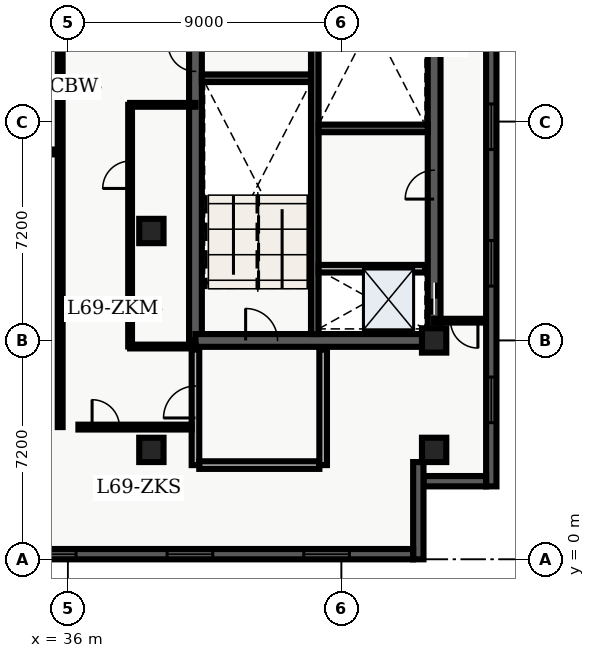
"""IFC4 building model, lengths in metres.
Left out: names, types, materials, properties, quantities, classifications, styles, units other than length and angle.
Written with IfcOpenShell. Run it as: python <this file> out.ifc"""

import sys

from ifc_helpers import new_model, entity, si_unit, converted_unit, direction, frame, origin_with_axes, origin_2d_with_axis, place, context, subcontext, project, spatial, polyline, rectangle, outline, extrude, element, fill, save


model = new_model("IFC4")
c1 = context("Model", 3, precision=1e-05, world=origin_with_axes(), true_north=direction((0.0, 1.0)))
c2 = subcontext(c1, "Body", "Model", "MODEL_VIEW")
j1 = project(units=[si_unit("LENGTHUNIT", "METRE"), converted_unit("PLANEANGLEUNIT", "DEGREE", entity("IfcPlaneAngleMeasure", 0.017), si_unit("PLANEANGLEUNIT", "RADIAN"), dimensions=[0, 0, 0, 0, 0, 0, 0])], contexts=[c1])
p1 = place(None, origin_with_axes())
s1 = spatial("IfcSite", under=j1, at=p1, CompositionType="ELEMENT")
p2 = place(p1, origin_with_axes())
s2 = spatial("IfcBuilding", under=s1, at=p2, CompositionType="ELEMENT")
p3 = place(p2, frame((0.0, 0.0, 280.2), z_axis=(0.0, 0.0, 1.0), x_axis=(1.0, 0.0, 0.0)))
s3 = spatial("IfcBuildingStorey", under=s2, at=p3, CompositionType="ELEMENT", Elevation=280.2)
p4 = place(p3, frame((40.2, 7.2, 0.0), z_axis=(0.0, 0.0, 1.0), x_axis=(0.0, 1.0, 0.0)))
e1 = element("IfcWall", 1, at=p4, inside=s3, PredefinedType="SHEAR", context=c2, shape_type="SweptSolid", body=[
    extrude(outline(polyline([(0.0, -0.21), (15.6, -0.21), (15.6, 0.21), (0.0, 0.21), (0.0, -0.21)])), origin_with_axes(), (0.0, 0.0, 1.0), 3.66),
])
p5 = place(p4, frame((12.75, 0.0, 0.0), z_axis=(0.0, 0.0, 1.0), x_axis=(1.0, 0.0, 0.0)))
e2 = element("IfcOpeningElement", 2, at=p5, cuts=e1, PredefinedType="OPENING", context=c2, shape_type="SweptSolid", body=[
    extrude(rectangle(XDim=1.2, YDim=0.44, at=origin_2d_with_axis()), origin_with_axes(), (0.0, 0.0, 1.0), 2.15),
])
p6 = place(p4, frame((9.3, 0.0, 0.0), z_axis=(0.0, 0.0, 1.0), x_axis=(1.0, 0.0, 0.0)))
e3 = element("IfcOpeningElement", 3, at=p6, cuts=e1, PredefinedType="OPENING", context=c2, shape_type="SweptSolid", body=[
    extrude(rectangle(XDim=0.9, YDim=0.44, at=origin_2d_with_axis()), origin_with_axes(), (0.0, 0.0, 1.0), 2.15),
])
p7 = place(p3, frame((40.2, 7.2, 0.0), z_axis=(0.0, 0.0, 1.0), x_axis=(1.0, 0.0, 0.0)))
e4 = element("IfcWall", 4, at=p7, inside=s3, PredefinedType="SHEAR", context=c2, shape_type="SweptSolid", body=[
    extrude(outline(polyline([(0.0, -0.21), (7.85, -0.21), (7.85, 0.21), (0.0, 0.21), (0.0, -0.21)])), origin_with_axes(), (0.0, 0.0, 1.0), 3.66),
])
p8 = place(p7, frame((2.175, 0.0, 0.0), z_axis=(0.0, 0.0, 1.0), x_axis=(1.0, 0.0, 0.0)))
e5 = element("IfcOpeningElement", 5, at=p8, cuts=e4, PredefinedType="OPENING", context=c2, shape_type="SweptSolid", body=[
    extrude(rectangle(XDim=1.05, YDim=0.44, at=origin_2d_with_axis()), origin_with_axes(), (0.0, 0.0, 1.0), 2.15),
])
p9 = place(p3, frame((48.05, 7.2, 0.0), z_axis=(0.0, 0.0, 1.0), x_axis=(0.0, 1.0, 0.0)))
e6 = element("IfcWall", 6, at=p9, inside=s3, PredefinedType="SHEAR", context=c2, shape_type="SweptSolid", body=[
    extrude(outline(polyline([(0.0, -0.21), (15.6, -0.21), (15.6, 0.21), (0.0, 0.21), (0.0, -0.21)])), origin_with_axes(), (0.0, 0.0, 1.0), 3.66),
])
p10 = place(p9, frame((1.375, 0.0, 0.0), z_axis=(0.0, 0.0, 1.0), x_axis=(1.0, 0.0, 0.0)))
e7 = element("IfcOpeningElement", 7, at=p10, cuts=e6, PredefinedType="OPENING", context=c2, shape_type="SweptSolid", body=[
    extrude(rectangle(XDim=1.05, YDim=0.44, at=origin_2d_with_axis()), origin_with_axes(), (0.0, 0.0, 1.0), 2.15),
])
p11 = place(p9, frame((5.125, 0.0, 0.0), z_axis=(0.0, 0.0, 1.0), x_axis=(1.0, 0.0, 0.0)))
e8 = element("IfcOpeningElement", 8, at=p11, cuts=e6, PredefinedType="OPENING", context=c2, shape_type="SweptSolid", body=[
    extrude(rectangle(XDim=0.95, YDim=0.44, at=origin_2d_with_axis()), origin_with_axes(), (0.0, 0.0, 1.0), 2.15),
])
p12 = place(p3, frame((44.125, 7.41, 0.0), z_axis=(0.0, 0.0, 1.0), x_axis=(0.0, 1.0, 0.0)))
e9 = element("IfcWall", 9, at=p12, inside=s3, PredefinedType="SHEAR", context=c2, shape_type="SweptSolid", body=[
    extrude(outline(polyline([(0.0, -0.125), (15.18, -0.125), (15.18, 0.125), (0.0, 0.125), (0.0, -0.125)])), origin_with_axes(), (0.0, 0.0, 1.0), 3.66),
])
for number, where, z_axis, x_axis in (
    (10, (40.41, 15.825, 0.0), (0.0, 0.0, 1.0), (1.0, 0.0, 0.0)),
    (11, (44.25, 14.175, 0.0), (0.0, 0.0, 1.0), (1.0, 0.0, 0.0)),
):
    element("IfcWall", number, at=place(p3, frame(where, z_axis=z_axis, x_axis=x_axis)), inside=s3, PredefinedType="SHEAR", context=c2, shape_type="SweptSolid", body=[
        extrude(outline(polyline([(0.0, -0.125), (3.59, -0.125), (3.59, 0.125), (0.0, 0.125), (0.0, -0.125)])), origin_with_axes(), (0.0, 0.0, 1.0), 3.66),
    ])
p13 = place(p3, frame((40.2, 3.1, 0.0), z_axis=(0.0, 0.0, 1.0), x_axis=(0.0, 1.0, 0.0)))
e12 = element("IfcWall", 12, at=p13, inside=s3, PredefinedType="SOLIDWALL", context=c2, shape_type="SweptSolid", body=[
    extrude(outline(polyline([(0.0, -0.125), (3.8, -0.125), (3.8, 0.125), (0.0, 0.125), (0.0, -0.125)])), origin_with_axes(), (0.0, 0.0, 1.0), 2.7),
])
p14 = place(p13, frame((2.075, 0.0, 0.0), z_axis=(0.0, 0.0, 1.0), x_axis=(1.0, 0.0, 0.0)))
e13 = element("IfcOpeningElement", 13, at=p14, cuts=e12, PredefinedType="OPENING", context=c2, shape_type="SweptSolid", body=[
    extrude(rectangle(XDim=1.05, YDim=0.27, at=origin_2d_with_axis()), origin_with_axes(), (0.0, 0.0, 1.0), 2.15),
])
p15 = place(p3, frame((40.325, 3.1, 0.0), z_axis=(0.0, 0.0, 1.0), x_axis=(1.0, 0.0, 0.0)))
e14 = element("IfcWall", 14, at=p15, inside=s3, PredefinedType="SOLIDWALL", context=c2, shape_type="SweptSolid", body=[
    extrude(outline(polyline([(0.0, -0.125), (3.95, -0.125), (3.95, 0.125), (0.0, 0.125), (0.0, -0.125)])), origin_with_axes(), (0.0, 0.0, 1.0), 2.7),
])
p16 = place(p3, frame((44.4, 3.1, 0.0), z_axis=(0.0, 0.0, 1.0), x_axis=(0.0, 1.0, 0.0)))
e15 = element("IfcWall", 15, at=p16, inside=s3, PredefinedType="SOLIDWALL", context=c2, shape_type="SweptSolid", body=[
    extrude(outline(polyline([(0.0, -0.125), (3.8, -0.125), (3.8, 0.125), (0.0, 0.125), (0.0, -0.125)])), origin_with_axes(), (0.0, 0.0, 1.0), 2.7),
])
for number, where, z_axis, x_axis in (
    (16, (38.75, 3.6, 0.0), (0.0, 0.0, 1.0), (1.0, 0.0, 0.0)),
    (17, (38.75, 10.8, 0.0), (0.0, 0.0, 1.0), (1.0, 0.0, 0.0)),
    (18, (48.05, 3.6, 0.0), (0.0, 0.0, 1.0), (1.0, 0.0, 0.0)),
    (19, (48.05, 7.2, 0.0), (0.0, 0.0, 1.0), (1.0, 0.0, 0.0)),
):
    element("IfcColumn", number, at=place(p3, frame(where, z_axis=z_axis, x_axis=x_axis)), inside=s3, PredefinedType="COLUMN", context=c2, shape_type="SweptSolid", body=[
        extrude(rectangle(XDim=0.8, YDim=0.8, at=origin_2d_with_axis()), origin_with_axes(), (0.0, 0.0, 1.0), 3.9),
    ])
p17 = place(p3, frame((44.25, 9.56, 0.0), z_axis=(0.0, 0.0, 1.0), x_axis=(1.0, 0.0, 0.0)))
e20 = element("IfcWall", 20, at=p17, inside=s3, PredefinedType="SOLIDWALL", context=c2, shape_type="SweptSolid", body=[
    extrude(outline(polyline([(0.0, -0.125), (3.5, -0.125), (3.5, 0.125), (0.0, 0.125), (0.0, -0.125)])), origin_with_axes(), (0.0, 0.0, 1.0), 2.7),
])
p18 = place(p3, frame((20.3, 13.4, 0.0), z_axis=(0.0, 0.0, 1.0), x_axis=(1.0, 0.0, 0.0)))
e21 = element("IfcWall", 21, at=p18, inside=s3, PredefinedType="PARTITIONING", context=c2, shape_type="SweptSolid", body=[
    extrude(outline(polyline([(0.0, -0.08), (15.45, -0.08), (15.45, 0.08), (0.0, 0.08), (0.0, -0.08)])), origin_with_axes(), (0.0, 0.0, 1.0), 2.7),
])
p19 = place(p18, frame((2.304, 0.0, 0.0), z_axis=(0.0, 0.0, 1.0), x_axis=(1.0, 0.0, 0.0)))
e22 = element("IfcOpeningElement", 22, at=p19, cuts=e21, PredefinedType="OPENING", context=c2, shape_type="SweptSolid", body=[
    extrude(rectangle(XDim=1.0, YDim=0.18, at=origin_2d_with_axis()), origin_with_axes(), (0.0, 0.0, 1.0), 2.15),
])
p20 = place(p18, frame((6.866, 0.0, 0.0), z_axis=(0.0, 0.0, 1.0), x_axis=(1.0, 0.0, 0.0)))
e23 = element("IfcOpeningElement", 23, at=p20, cuts=e21, PredefinedType="OPENING", context=c2, shape_type="SweptSolid", body=[
    extrude(rectangle(XDim=1.0, YDim=0.18, at=origin_2d_with_axis()), origin_with_axes(), (0.0, 0.0, 1.0), 2.15),
])
p21 = place(p18, frame((12.337, 0.0, 0.0), z_axis=(0.0, 0.0, 1.0), x_axis=(1.0, 0.0, 0.0)))
e24 = element("IfcOpeningElement", 24, at=p21, cuts=e21, PredefinedType="OPENING", context=c2, shape_type="SweptSolid", body=[
    extrude(rectangle(XDim=1.2, YDim=0.18, at=origin_2d_with_axis()), origin_with_axes(), (0.0, 0.0, 1.0), 2.2),
])
p22 = place(p3, frame((20.3, 15.7, 0.0), z_axis=(0.0, 0.0, 1.0), x_axis=(1.0, 0.0, 0.0)))
e25 = element("IfcWall", 25, at=p22, inside=s3, PredefinedType="PARTITIONING", context=c2, shape_type="SweptSolid", body=[
    extrude(outline(polyline([(0.0, -0.08), (15.45, -0.08), (15.45, 0.08), (0.0, 0.08), (0.0, -0.08)])), origin_with_axes(), (0.0, 0.0, 1.0), 2.7),
])
p23 = place(p22, frame((7.775, 0.0, 0.0), z_axis=(0.0, 0.0, 1.0), x_axis=(1.0, 0.0, 0.0)))
e26 = element("IfcOpeningElement", 26, at=p23, cuts=e25, PredefinedType="OPENING", context=c2, shape_type="SweptSolid", body=[
    extrude(rectangle(XDim=1.0, YDim=0.18, at=origin_2d_with_axis()), origin_with_axes(), (0.0, 0.0, 1.0), 2.15),
])
p24 = place(p3, frame((35.75, 4.35, 0.0), z_axis=(0.0, 0.0, 1.0), x_axis=(0.0, 1.0, 0.0)))
e27 = element("IfcWall", 27, at=p24, inside=s3, PredefinedType="PARTITIONING", context=c2, shape_type="SweptSolid", body=[
    extrude(outline(polyline([(0.0, -0.08), (16.95, -0.08), (16.95, 0.08), (0.0, 0.08), (0.0, -0.08)])), origin_with_axes(), (0.0, 0.0, 1.0), 2.7),
])
p25 = place(p3, frame((49.765, 7.85, 0.0), z_axis=(0.0, 0.0, 1.0), x_axis=(-1.0, 0.0, 0.0)))
e28 = element("IfcWall", 28, at=p25, inside=s3, PredefinedType="PARTITIONING", context=c2, shape_type="SweptSolid", body=[
    extrude(outline(polyline([(0.0, -0.062), (1.715, -0.062), (1.715, 0.062), (0.0, 0.062), (0.0, -0.062)])), origin_with_axes(), (0.0, 0.0, 1.0), 2.7),
])
p26 = place(p25, frame((0.725, 0.0, 0.0), z_axis=(0.0, 0.0, 1.0), x_axis=(1.0, 0.0, 0.0)))
e29 = element("IfcOpeningElement", 29, at=p26, cuts=e28, PredefinedType="OPENING", context=c2, shape_type="SweptSolid", body=[
    extrude(rectangle(XDim=0.9, YDim=0.145, at=origin_2d_with_axis()), origin_with_axes(), (0.0, 0.0, 1.0), 2.15),
])
p27 = place(p3, frame((36.35, 4.35, 0.0), z_axis=(0.0, 0.0, 1.0), x_axis=(1.0, 0.0, 0.0)))
e30 = element("IfcWall", 30, at=p27, inside=s3, PredefinedType="PARTITIONING", context=c2, shape_type="SweptSolid", body=[
    extrude(outline(polyline([(0.0, -0.08), (3.725, -0.08), (3.725, 0.08), (0.0, 0.08), (0.0, -0.08)])), origin_with_axes(), (0.0, 0.0, 1.0), 2.7),
])
p28 = place(p27, frame((0.9, 0.0, 0.0), z_axis=(0.0, 0.0, 1.0), x_axis=(1.0, 0.0, 0.0)))
e31 = element("IfcOpeningElement", 31, at=p28, cuts=e30, PredefinedType="OPENING", context=c2, shape_type="SweptSolid", body=[
    extrude(rectangle(XDim=0.9, YDim=0.18, at=origin_2d_with_axis()), origin_with_axes(), (0.0, 0.0, 1.0), 2.15),
])
for number, where, z_axis, x_axis in (
    (32, (38.05, 7.0, 0.0), (0.0, 0.0, 1.0), (1.0, 0.0, 0.0)),
    (33, (38.05, 14.95, 0.0), (0.0, 0.0, 1.0), (1.0, 0.0, 0.0)),
):
    element("IfcWall", number, at=place(p3, frame(where, z_axis=z_axis, x_axis=x_axis)), inside=s3, PredefinedType="PARTITIONING", context=c2, shape_type="SweptSolid", body=[
        extrude(outline(polyline([(0.0, -0.062), (2.15, -0.062), (2.15, 0.062), (0.0, 0.062), (0.0, -0.062)])), origin_with_axes(), (0.0, 0.0, 1.0), 2.7),
    ])
p29 = place(p3, frame((38.05, 7.0, 0.0), z_axis=(0.0, 0.0, 1.0), x_axis=(0.0, 1.0, 0.0)))
e34 = element("IfcWall", 34, at=p29, inside=s3, PredefinedType="PARTITIONING", context=c2, shape_type="SweptSolid", body=[
    extrude(outline(polyline([(0.0, -0.062), (7.95, -0.062), (7.95, 0.062), (0.0, 0.062), (0.0, -0.062)])), origin_with_axes(), (0.0, 0.0, 1.0), 2.7),
])
p30 = place(p29, frame((5.65, 0.0, 0.0), z_axis=(0.0, 0.0, 1.0), x_axis=(1.0, 0.0, 0.0)))
e35 = element("IfcOpeningElement", 35, at=p30, cuts=e34, PredefinedType="OPENING", context=c2, shape_type="SweptSolid", body=[
    extrude(rectangle(XDim=0.9, YDim=0.145, at=origin_2d_with_axis()), origin_with_axes(), (0.0, 0.0, 1.0), 2.15),
])
p31 = place(p3, frame((49.93, 26.06, 0.0), z_axis=(0.0, 0.0, 1.0), x_axis=(0.0, -1.0, 0.0)))
e36 = element("IfcWall", 36, at=p31, inside=s3, PredefinedType="SOLIDWALL", context=c2, shape_type="SweptSolid", body=[
    extrude(outline(polyline([(0.0, -0.17), (23.66, -0.17), (23.66, 0.17), (0.0, 0.17), (0.0, -0.17)])), origin_with_axes(), (0.0, 0.0, 1.0), 3.66),
])
p32 = place(p31, frame((2.846, 0.0, 0.45), z_axis=(0.0, 0.0, 1.0), x_axis=(1.0, 0.0, 0.0)))
e37 = element("IfcOpeningElement", 37, at=p32, cuts=e36, PredefinedType="OPENING", context=c2, shape_type="SweptSolid", body=[
    extrude(rectangle(XDim=1.5, YDim=0.36, at=origin_2d_with_axis()), origin_with_axes(), (0.0, 0.0, 1.0), 2.1),
])
p33 = place(p31, frame((7.338, 0.0, 0.45), z_axis=(0.0, 0.0, 1.0), x_axis=(1.0, 0.0, 0.0)))
e38 = element("IfcOpeningElement", 38, at=p33, cuts=e36, PredefinedType="OPENING", context=c2, shape_type="SweptSolid", body=[
    extrude(rectangle(XDim=1.5, YDim=0.36, at=origin_2d_with_axis()), origin_with_axes(), (0.0, 0.0, 1.0), 2.1),
])
p34 = place(p31, frame((11.83, 0.0, 0.45), z_axis=(0.0, 0.0, 1.0), x_axis=(1.0, 0.0, 0.0)))
e39 = element("IfcOpeningElement", 39, at=p34, cuts=e36, PredefinedType="OPENING", context=c2, shape_type="SweptSolid", body=[
    extrude(rectangle(XDim=1.5, YDim=0.36, at=origin_2d_with_axis()), origin_with_axes(), (0.0, 0.0, 1.0), 2.1),
])
p35 = place(p31, frame((16.322, 0.0, 0.45), z_axis=(0.0, 0.0, 1.0), x_axis=(1.0, 0.0, 0.0)))
e40 = element("IfcOpeningElement", 40, at=p35, cuts=e36, PredefinedType="OPENING", context=c2, shape_type="SweptSolid", body=[
    extrude(rectangle(XDim=1.5, YDim=0.36, at=origin_2d_with_axis()), origin_with_axes(), (0.0, 0.0, 1.0), 2.1),
])
p36 = place(p31, frame((20.814, 0.0, 0.45), z_axis=(0.0, 0.0, 1.0), x_axis=(1.0, 0.0, 0.0)))
e41 = element("IfcOpeningElement", 41, at=p36, cuts=e36, PredefinedType="OPENING", context=c2, shape_type="SweptSolid", body=[
    extrude(rectangle(XDim=1.5, YDim=0.36, at=origin_2d_with_axis()), origin_with_axes(), (0.0, 0.0, 1.0), 2.1),
])
p37 = place(p3, frame((49.76, 2.57, 0.0), z_axis=(0.0, 0.0, 1.0), x_axis=(-1.0, 0.0, 0.0)))
e42 = element("IfcWall", 42, at=p37, inside=s3, PredefinedType="SOLIDWALL", context=c2, shape_type="SweptSolid", body=[
    extrude(outline(polyline([(0.0, -0.17), (2.06, -0.17), (2.06, 0.17), (0.0, 0.17), (0.0, -0.17)])), origin_with_axes(), (0.0, 0.0, 1.0), 3.66),
])
p38 = place(p3, frame((47.53, 3.2, 0.0), z_axis=(0.0, 0.0, 1.0), x_axis=(0.0, -1.0, 0.0)))
e43 = element("IfcWall", 43, at=p38, inside=s3, PredefinedType="SOLIDWALL", context=c2, shape_type="SweptSolid", body=[
    extrude(outline(polyline([(0.0, -0.17), (3.2, -0.17), (3.2, 0.17), (0.0, 0.17), (0.0, -0.17)])), origin_with_axes(), (0.0, 0.0, 1.0), 3.66),
])
p39 = place(p3, frame((47.36, 0.17, 0.0), z_axis=(0.0, 0.0, 1.0), x_axis=(-1.0, 0.0, 0.0)))
e44 = element("IfcWall", 44, at=p39, inside=s3, PredefinedType="SOLIDWALL", context=c2, shape_type="SweptSolid", body=[
    extrude(outline(polyline([(0.0, -0.17), (37.16, -0.17), (37.16, 0.17), (0.0, 0.17), (0.0, -0.17)])), origin_with_axes(), (0.0, 0.0, 1.0), 3.66),
])
p40 = place(p39, frame((2.847, 0.0, 0.45), z_axis=(0.0, 0.0, 1.0), x_axis=(1.0, 0.0, 0.0)))
e45 = element("IfcOpeningElement", 45, at=p40, cuts=e44, PredefinedType="OPENING", context=c2, shape_type="SweptSolid", body=[
    extrude(rectangle(XDim=1.5, YDim=0.36, at=origin_2d_with_axis()), origin_with_axes(), (0.0, 0.0, 1.0), 2.1),
])
p41 = place(p39, frame((7.342, 0.0, 0.45), z_axis=(0.0, 0.0, 1.0), x_axis=(1.0, 0.0, 0.0)))
e46 = element("IfcOpeningElement", 46, at=p41, cuts=e44, PredefinedType="OPENING", context=c2, shape_type="SweptSolid", body=[
    extrude(rectangle(XDim=1.5, YDim=0.36, at=origin_2d_with_axis()), origin_with_axes(), (0.0, 0.0, 1.0), 2.1),
])
p42 = place(p39, frame((11.837, 0.0, 0.45), z_axis=(0.0, 0.0, 1.0), x_axis=(1.0, 0.0, 0.0)))
e47 = element("IfcOpeningElement", 47, at=p42, cuts=e44, PredefinedType="OPENING", context=c2, shape_type="SweptSolid", body=[
    extrude(rectangle(XDim=1.5, YDim=0.36, at=origin_2d_with_axis()), origin_with_axes(), (0.0, 0.0, 1.0), 2.1),
])
p43 = place(p39, frame((16.332, 0.0, 0.45), z_axis=(0.0, 0.0, 1.0), x_axis=(1.0, 0.0, 0.0)))
e48 = element("IfcOpeningElement", 48, at=p43, cuts=e44, PredefinedType="OPENING", context=c2, shape_type="SweptSolid", body=[
    extrude(rectangle(XDim=1.5, YDim=0.36, at=origin_2d_with_axis()), origin_with_axes(), (0.0, 0.0, 1.0), 2.1),
])
p44 = place(p39, frame((20.827, 0.0, 0.45), z_axis=(0.0, 0.0, 1.0), x_axis=(1.0, 0.0, 0.0)))
e49 = element("IfcOpeningElement", 49, at=p44, cuts=e44, PredefinedType="OPENING", context=c2, shape_type="SweptSolid", body=[
    extrude(rectangle(XDim=1.5, YDim=0.36, at=origin_2d_with_axis()), origin_with_axes(), (0.0, 0.0, 1.0), 2.1),
])
p45 = place(p39, frame((25.322, 0.0, 0.45), z_axis=(0.0, 0.0, 1.0), x_axis=(1.0, 0.0, 0.0)))
e50 = element("IfcOpeningElement", 50, at=p45, cuts=e44, PredefinedType="OPENING", context=c2, shape_type="SweptSolid", body=[
    extrude(rectangle(XDim=1.5, YDim=0.36, at=origin_2d_with_axis()), origin_with_axes(), (0.0, 0.0, 1.0), 2.1),
])
p46 = place(p39, frame((29.817, 0.0, 0.45), z_axis=(0.0, 0.0, 1.0), x_axis=(1.0, 0.0, 0.0)))
e51 = element("IfcOpeningElement", 51, at=p46, cuts=e44, PredefinedType="OPENING", context=c2, shape_type="SweptSolid", body=[
    extrude(rectangle(XDim=1.5, YDim=0.36, at=origin_2d_with_axis()), origin_with_axes(), (0.0, 0.0, 1.0), 2.1),
])
p47 = place(p39, frame((34.312, 0.0, 0.45), z_axis=(0.0, 0.0, 1.0), x_axis=(1.0, 0.0, 0.0)))
e52 = element("IfcOpeningElement", 52, at=p47, cuts=e44, PredefinedType="OPENING", context=c2, shape_type="SweptSolid", body=[
    extrude(rectangle(XDim=1.5, YDim=0.36, at=origin_2d_with_axis()), origin_with_axes(), (0.0, 0.0, 1.0), 2.1),
])
p48 = place(p9, frame((1.375, 0.0, 0.0), z_axis=(0.0, 0.0, 1.0), x_axis=(1.0, 0.0, 0.0)))
e53 = element("IfcDoor", 53, at=p48, inside=s3, OperationType="SLIDING_TO_LEFT", PredefinedType="DOOR", context=c2, shape_type="SweptSolid", body=[
    extrude(rectangle(XDim=1.05, YDim=0.09, at=origin_2d_with_axis()), origin_with_axes(), (0.0, 0.0, 1.0), 2.15),
])
fill(e7, e53)
p49 = place(p4, frame((9.3, 0.0, 0.0), z_axis=(0.0, 0.0, 1.0), x_axis=(1.0, 0.0, 0.0)))
e54 = element("IfcDoor", 54, at=p49, inside=s3, OperationType="SINGLE_SWING_RIGHT", PredefinedType="DOOR", context=c2, shape_type="SweptSolid", body=[
    extrude(rectangle(XDim=0.9, YDim=0.09, at=origin_2d_with_axis()), origin_with_axes(), (0.0, 0.0, 1.0), 2.15),
])
fill(e3, e54)
p50 = place(p7, frame((2.175, 0.0, 0.0), z_axis=(0.0, 0.0, 1.0), x_axis=(1.0, 0.0, 0.0)))
e55 = element("IfcDoor", 55, at=p50, inside=s3, OperationType="SINGLE_SWING_LEFT", PredefinedType="DOOR", context=c2, shape_type="SweptSolid", body=[
    extrude(rectangle(XDim=1.05, YDim=0.09, at=origin_2d_with_axis()), origin_with_axes(), (0.0, 0.0, 1.0), 2.15),
])
fill(e5, e55)
p51 = place(p13, frame((2.075, 0.0, 0.0), z_axis=(0.0, 0.0, 1.0), x_axis=(1.0, 0.0, 0.0)))
e56 = element("IfcDoor", 56, at=p51, inside=s3, OperationType="SINGLE_SWING_LEFT", PredefinedType="DOOR", context=c2, shape_type="SweptSolid", body=[
    extrude(rectangle(XDim=1.05, YDim=0.09, at=origin_2d_with_axis()), origin_with_axes(), (0.0, 0.0, 1.0), 2.15),
])
fill(e13, e56)
p52 = place(p9, frame((5.125, 0.0, 0.0), z_axis=(0.0, 0.0, 1.0), x_axis=(1.0, 0.0, 0.0)))
e57 = element("IfcDoor", 57, at=p52, inside=s3, OperationType="SINGLE_SWING_LEFT", PredefinedType="DOOR", context=c2, shape_type="SweptSolid", body=[
    extrude(rectangle(XDim=0.95, YDim=0.09, at=origin_2d_with_axis()), origin_with_axes(), (0.0, 0.0, 1.0), 2.15),
])
fill(e8, e57)
p53 = place(p25, frame((0.725, 0.0, 0.0), z_axis=(0.0, 0.0, 1.0), x_axis=(1.0, 0.0, 0.0)))
e58 = element("IfcDoor", 58, at=p53, inside=s3, OperationType="SINGLE_SWING_LEFT", PredefinedType="DOOR", context=c2, shape_type="SweptSolid", body=[
    extrude(rectangle(XDim=0.9, YDim=0.075, at=origin_2d_with_axis()), origin_with_axes(), (0.0, 0.0, 1.0), 2.15),
])
fill(e29, e58)
p54 = place(p27, frame((0.9, 0.0, 0.0), z_axis=(0.0, 0.0, 1.0), x_axis=(1.0, 0.0, 0.0)))
e59 = element("IfcDoor", 59, at=p54, inside=s3, OperationType="SINGLE_SWING_LEFT", PredefinedType="DOOR", context=c2, shape_type="SweptSolid", body=[
    extrude(rectangle(XDim=0.9, YDim=0.09, at=origin_2d_with_axis()), origin_with_axes(), (0.0, 0.0, 1.0), 2.15),
])
fill(e31, e59)
p55 = place(p29, frame((5.65, 0.0, 0.0), z_axis=(0.0, 0.0, 1.0), x_axis=(1.0, 0.0, 0.0)))
e60 = element("IfcDoor", 60, at=p55, inside=s3, OperationType="SINGLE_SWING_LEFT", PredefinedType="DOOR", context=c2, shape_type="SweptSolid", body=[
    extrude(rectangle(XDim=0.9, YDim=0.075, at=origin_2d_with_axis()), origin_with_axes(), (0.0, 0.0, 1.0), 2.15),
])
fill(e35, e60)
p56 = place(p31, frame((11.83, 0.0, 0.45), z_axis=(0.0, 0.0, 1.0), x_axis=(1.0, 0.0, 0.0)))
e61 = element("IfcWindow", 61, at=p56, inside=s3, PredefinedType="WINDOW", context=c2, shape_type="SweptSolid", body=[
    extrude(rectangle(XDim=1.5, YDim=0.09, at=origin_2d_with_axis()), origin_with_axes(), (0.0, 0.0, 1.0), 2.1),
])
fill(e39, e61)
p57 = place(p31, frame((16.322, 0.0, 0.45), z_axis=(0.0, 0.0, 1.0), x_axis=(1.0, 0.0, 0.0)))
e62 = element("IfcWindow", 62, at=p57, inside=s3, PredefinedType="WINDOW", context=c2, shape_type="SweptSolid", body=[
    extrude(rectangle(XDim=1.5, YDim=0.09, at=origin_2d_with_axis()), origin_with_axes(), (0.0, 0.0, 1.0), 2.1),
])
fill(e40, e62)
p58 = place(p31, frame((20.814, 0.0, 0.45), z_axis=(0.0, 0.0, 1.0), x_axis=(1.0, 0.0, 0.0)))
e63 = element("IfcWindow", 63, at=p58, inside=s3, PredefinedType="WINDOW", context=c2, shape_type="SweptSolid", body=[
    extrude(rectangle(XDim=1.5, YDim=0.09, at=origin_2d_with_axis()), origin_with_axes(), (0.0, 0.0, 1.0), 2.1),
])
fill(e41, e63)
p59 = place(p39, frame((2.847, 0.0, 0.45), z_axis=(0.0, 0.0, 1.0), x_axis=(1.0, 0.0, 0.0)))
e64 = element("IfcWindow", 64, at=p59, inside=s3, PredefinedType="WINDOW", context=c2, shape_type="SweptSolid", body=[
    extrude(rectangle(XDim=1.5, YDim=0.09, at=origin_2d_with_axis()), origin_with_axes(), (0.0, 0.0, 1.0), 2.1),
])
fill(e45, e64)
p60 = place(p39, frame((7.342, 0.0, 0.45), z_axis=(0.0, 0.0, 1.0), x_axis=(1.0, 0.0, 0.0)))
e65 = element("IfcWindow", 65, at=p60, inside=s3, PredefinedType="WINDOW", context=c2, shape_type="SweptSolid", body=[
    extrude(rectangle(XDim=1.5, YDim=0.09, at=origin_2d_with_axis()), origin_with_axes(), (0.0, 0.0, 1.0), 2.1),
])
fill(e46, e65)
p61 = place(p39, frame((11.837, 0.0, 0.45), z_axis=(0.0, 0.0, 1.0), x_axis=(1.0, 0.0, 0.0)))
e66 = element("IfcWindow", 66, at=p61, inside=s3, PredefinedType="WINDOW", context=c2, shape_type="SweptSolid", body=[
    extrude(rectangle(XDim=1.5, YDim=0.09, at=origin_2d_with_axis()), origin_with_axes(), (0.0, 0.0, 1.0), 2.1),
])
fill(e47, e66)
save(model, sys.argv[1])
